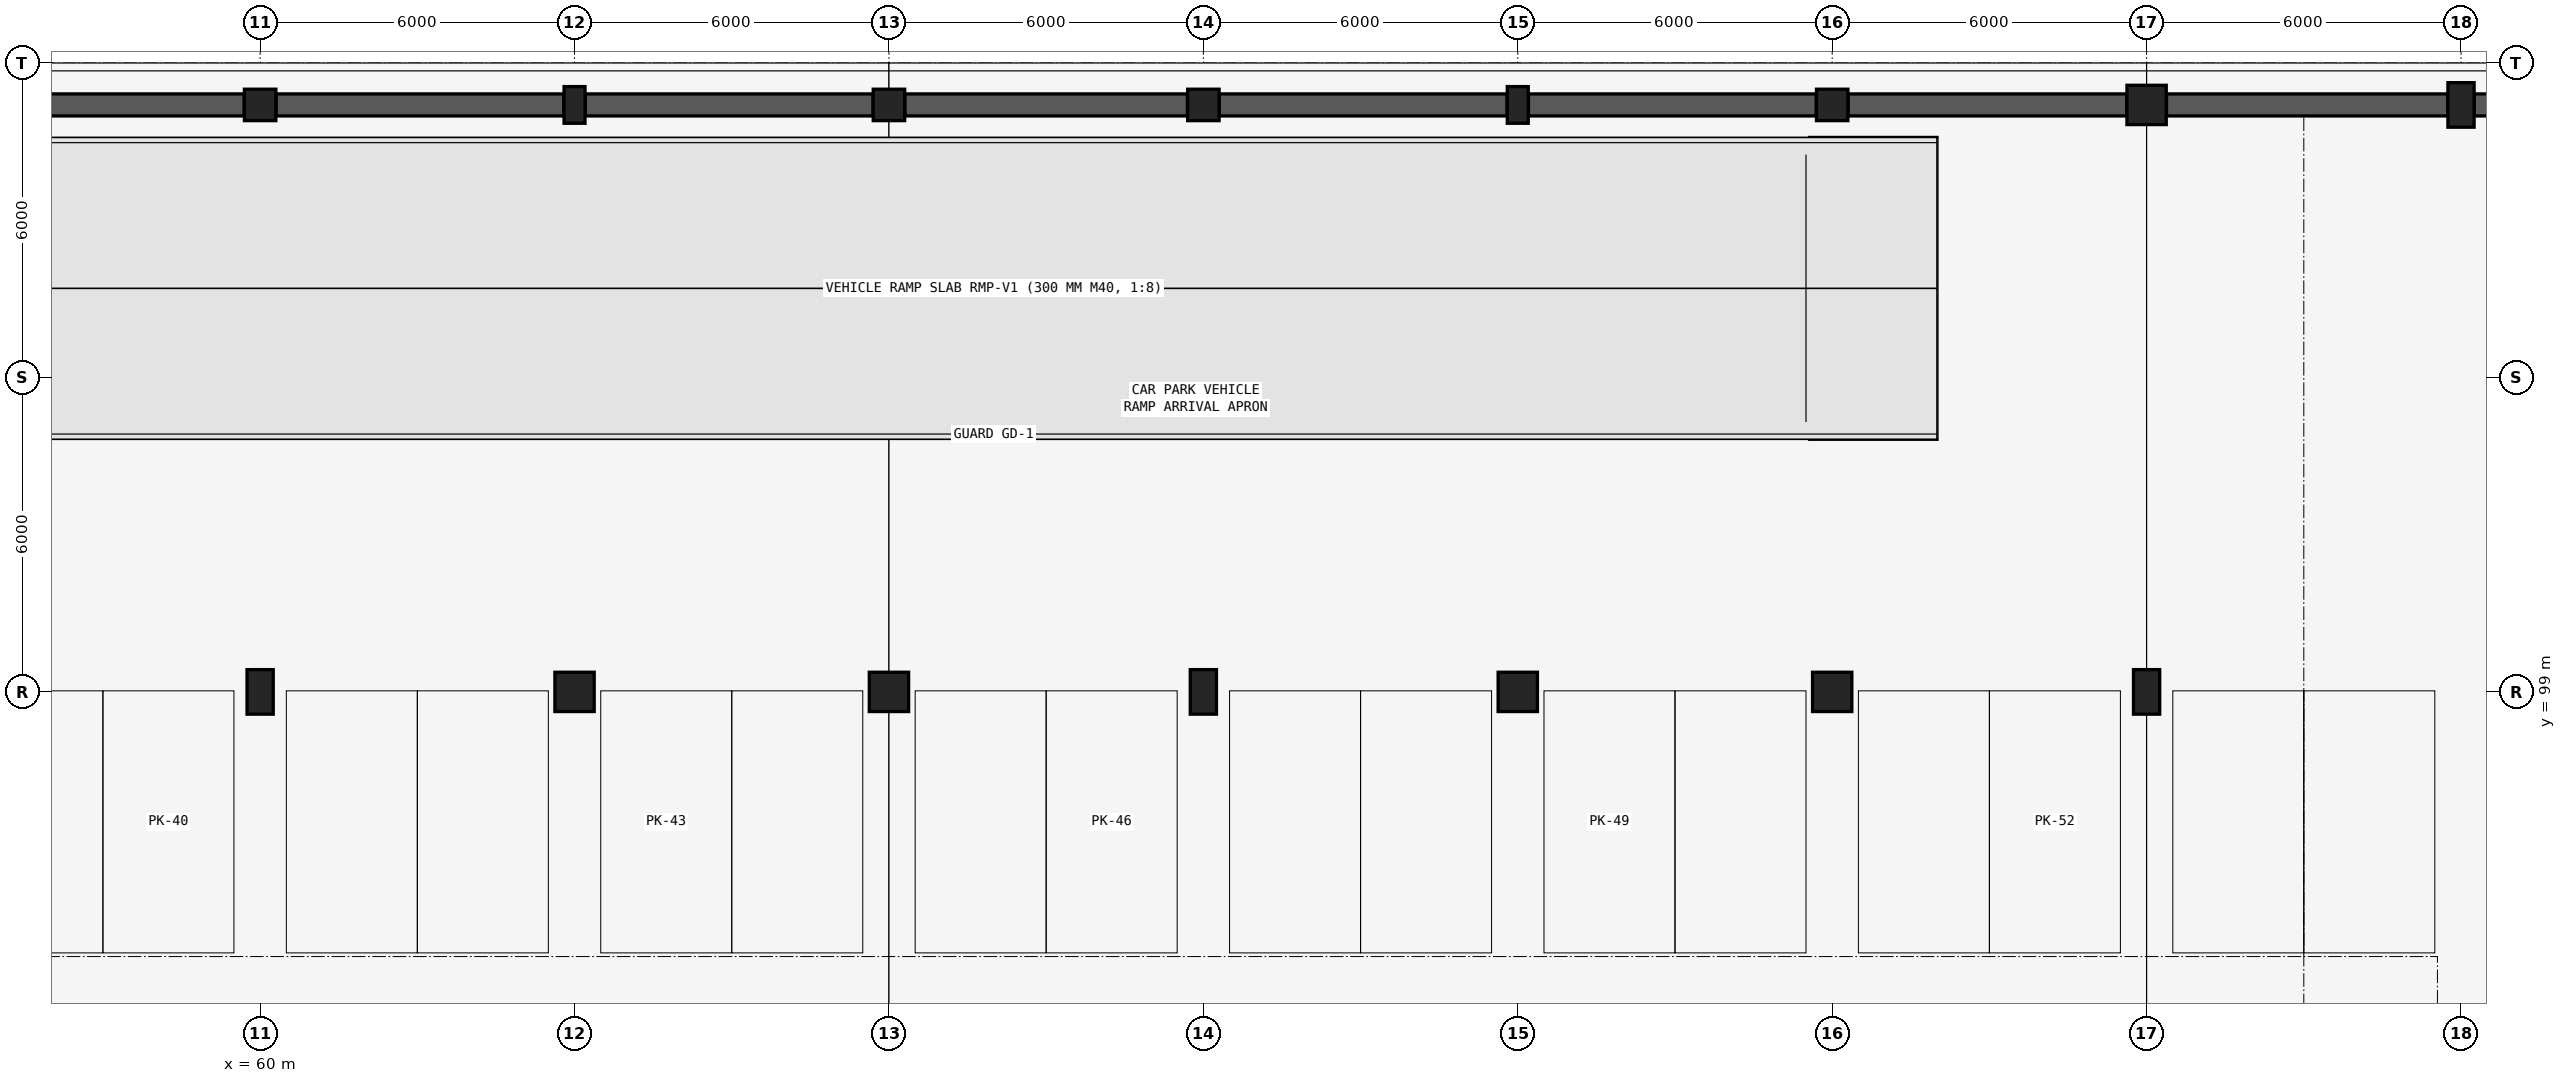
"""IFC4 building model, lengths in metres.
Left out: names, types, materials, properties, quantities, classifications, styles, units other than length and angle.
Written with IfcOpenShell. Run it as: python <this file> out.ifc"""

import sys

from ifc_helpers import new_model, si_unit, direction, frame, frame_2d, origin, origin_2d, place, context, subcontext, project, spatial, rectangle, extrude, element, save


model = new_model("IFC4")
c1 = context("Model", 3, precision=1e-05, world=origin(), true_north=direction((0.0, 1.0)))
c2 = subcontext(c1, "Body", "Model", "MODEL_VIEW")
j1 = project(units=[si_unit("LENGTHUNIT", "METRE"), si_unit("PLANEANGLEUNIT", "RADIAN")], contexts=[c1])
p1 = place(None, origin())
s1 = spatial("IfcSite", under=j1, at=p1, CompositionType="ELEMENT")
p2 = place(p1, origin())
s2 = spatial("IfcBuilding", under=s1, at=p2, CompositionType="ELEMENT")
p3 = place(p2, frame((0.0, 0.0, -4.5)))
s3 = spatial("IfcBuildingStorey", under=s2, at=p3, CompositionType="ELEMENT", Elevation=-4.5)
p4 = place(p3, frame((60.0, 99.0, 0.0), z_axis=(0.0, 0.0, 1.0), x_axis=(1.0, 0.0, 0.0)))
e1 = element("IfcColumn", 1, at=p4, inside=s3, PredefinedType="COLUMN", context=c2, shape_type="SweptSolid", body=[
    extrude(rectangle(XDim=0.5, YDim=0.85, at=origin_2d()), origin(), (0.0, 0.0, 1.0), 4.5),
])
p5 = place(p3, frame((60.0, 110.2, 0.0), z_axis=(0.0, 0.0, 1.0), x_axis=(1.0, 0.0, 0.0)))
e2 = element("IfcColumn", 2, at=p5, inside=s3, PredefinedType="COLUMN", context=c2, shape_type="SweptSolid", body=[
    extrude(rectangle(XDim=0.6, YDim=0.6, at=origin_2d()), origin(), (0.0, 0.0, 1.0), 4.5),
])
p6 = place(p3, frame((66.0, 99.0, 0.0), z_axis=(0.0, 0.0, 1.0), x_axis=(1.0, 0.0, 0.0)))
e3 = element("IfcColumn", 3, at=p6, inside=s3, PredefinedType="COLUMN", context=c2, shape_type="SweptSolid", body=[
    extrude(rectangle(XDim=0.75, YDim=0.75, at=origin_2d()), origin(), (0.0, 0.0, 1.0), 4.5),
])
p7 = place(p3, frame((66.0, 110.2, 0.0), z_axis=(0.0, 0.0, 1.0), x_axis=(1.0, 0.0, 0.0)))
e4 = element("IfcColumn", 4, at=p7, inside=s3, PredefinedType="COLUMN", context=c2, shape_type="SweptSolid", body=[
    extrude(rectangle(XDim=0.4, YDim=0.7, at=origin_2d()), origin(), (0.0, 0.0, 1.0), 4.5),
])
p8 = place(p3, frame((72.0, 99.0, 0.0), z_axis=(0.0, 0.0, 1.0), x_axis=(1.0, 0.0, 0.0)))
e5 = element("IfcColumn", 5, at=p8, inside=s3, PredefinedType="COLUMN", context=c2, shape_type="SweptSolid", body=[
    extrude(rectangle(XDim=0.75, YDim=0.75, at=origin_2d()), origin(), (0.0, 0.0, 1.0), 4.5),
])
p9 = place(p3, frame((72.0, 110.2, 0.0), z_axis=(0.0, 0.0, 1.0), x_axis=(1.0, 0.0, 0.0)))
e6 = element("IfcColumn", 6, at=p9, inside=s3, PredefinedType="COLUMN", context=c2, shape_type="SweptSolid", body=[
    extrude(rectangle(XDim=0.6, YDim=0.6, at=origin_2d()), origin(), (0.0, 0.0, 1.0), 4.5),
])
p10 = place(p3, frame((78.0, 99.0, 0.0), z_axis=(0.0, 0.0, 1.0), x_axis=(1.0, 0.0, 0.0)))
e7 = element("IfcColumn", 7, at=p10, inside=s3, PredefinedType="COLUMN", context=c2, shape_type="SweptSolid", body=[
    extrude(rectangle(XDim=0.5, YDim=0.85, at=origin_2d()), origin(), (0.0, 0.0, 1.0), 4.5),
])
p11 = place(p3, frame((78.0, 110.2, 0.0), z_axis=(0.0, 0.0, 1.0), x_axis=(1.0, 0.0, 0.0)))
e8 = element("IfcColumn", 8, at=p11, inside=s3, PredefinedType="COLUMN", context=c2, shape_type="SweptSolid", body=[
    extrude(rectangle(XDim=0.6, YDim=0.6, at=origin_2d()), origin(), (0.0, 0.0, 1.0), 4.5),
])
p12 = place(p3, frame((84.0, 99.0, 0.0), z_axis=(0.0, 0.0, 1.0), x_axis=(1.0, 0.0, 0.0)))
e9 = element("IfcColumn", 9, at=p12, inside=s3, PredefinedType="COLUMN", context=c2, shape_type="SweptSolid", body=[
    extrude(rectangle(XDim=0.75, YDim=0.75, at=origin_2d()), origin(), (0.0, 0.0, 1.0), 4.5),
])
p13 = place(p3, frame((84.0, 110.2, 0.0), z_axis=(0.0, 0.0, 1.0), x_axis=(1.0, 0.0, 0.0)))
e10 = element("IfcColumn", 10, at=p13, inside=s3, PredefinedType="COLUMN", context=c2, shape_type="SweptSolid", body=[
    extrude(rectangle(XDim=0.4, YDim=0.7, at=origin_2d()), origin(), (0.0, 0.0, 1.0), 4.5),
])
p14 = place(p3, frame((90.0, 99.0, 0.0), z_axis=(0.0, 0.0, 1.0), x_axis=(1.0, 0.0, 0.0)))
e11 = element("IfcColumn", 11, at=p14, inside=s3, PredefinedType="COLUMN", context=c2, shape_type="SweptSolid", body=[
    extrude(rectangle(XDim=0.75, YDim=0.75, at=origin_2d()), origin(), (0.0, 0.0, 1.0), 4.5),
])
p15 = place(p3, frame((90.0, 110.2, 0.0), z_axis=(0.0, 0.0, 1.0), x_axis=(1.0, 0.0, 0.0)))
e12 = element("IfcColumn", 12, at=p15, inside=s3, PredefinedType="COLUMN", context=c2, shape_type="SweptSolid", body=[
    extrude(rectangle(XDim=0.6, YDim=0.6, at=origin_2d()), origin(), (0.0, 0.0, 1.0), 4.5),
])
p16 = place(p3, frame((96.0, 99.0, 0.0), z_axis=(0.0, 0.0, 1.0), x_axis=(1.0, 0.0, 0.0)))
e13 = element("IfcColumn", 13, at=p16, inside=s3, PredefinedType="COLUMN", context=c2, shape_type="SweptSolid", body=[
    extrude(rectangle(XDim=0.5, YDim=0.85, at=origin_2d()), origin(), (0.0, 0.0, 1.0), 4.5),
])
p17 = place(p3, frame((96.0, 110.2, 0.0), z_axis=(0.0, 0.0, 1.0), x_axis=(1.0, 0.0, 0.0)))
e14 = element("IfcColumn", 14, at=p17, inside=s3, PredefinedType="COLUMN", context=c2, shape_type="SweptSolid", body=[
    extrude(rectangle(XDim=0.75, YDim=0.75, at=origin_2d()), origin(), (0.0, 0.0, 1.0), 4.5),
])
p18 = place(p3, frame((102.0, 110.2, 0.0), z_axis=(0.0, 0.0, 1.0), x_axis=(1.0, 0.0, 0.0)))
e15 = element("IfcColumn", 15, at=p18, inside=s3, PredefinedType="COLUMN", context=c2, shape_type="SweptSolid", body=[
    extrude(rectangle(XDim=0.5, YDim=0.85, at=origin_2d()), origin(), (0.0, 0.0, 1.0), 4.5),
])
p19 = place(p3, frame((54.379, 110.2, 0.0), z_axis=(0.0, 0.0, 1.0), x_axis=(1.0, 0.0, 0.0)))
e16 = element("IfcWall", 16, at=p19, inside=s3, PredefinedType="SHEAR", context=c2, shape_type="SweptSolid", body=[
    extrude(rectangle(XDim=5.317, YDim=0.42, at=frame_2d((2.659, 0.0))), origin(), (0.0, 0.0, 1.0), 4.195),
])
for number, where, z_axis, x_axis in (
    (17, (60.304, 110.2, 0.0), (0.0, 0.0, 1.0), (1.0, 0.0, 0.0)),
    (18, (66.204, 110.2, 0.0), (0.0, 0.0, 1.0), (1.0, 0.0, 0.0)),
):
    element("IfcWall", number, at=place(p3, frame(where, z_axis=z_axis, x_axis=x_axis)), inside=s3, PredefinedType="SHEAR", context=c2, shape_type="SweptSolid", body=[
        extrude(rectangle(XDim=5.492, YDim=0.42, at=frame_2d((2.746, 0.0))), origin(), (0.0, 0.0, 1.0), 4.195),
    ])
p20 = place(p3, frame((72.304, 110.2, 0.0), z_axis=(0.0, 0.0, 1.0), x_axis=(1.0, 0.0, 0.0)))
e19 = element("IfcWall", 19, at=p20, inside=s3, PredefinedType="SHEAR", context=c2, shape_type="SweptSolid", body=[
    extrude(rectangle(XDim=5.392, YDim=0.42, at=frame_2d((2.696, 0.0))), origin(), (0.0, 0.0, 1.0), 4.195),
])
for number, where, z_axis, x_axis in (
    (20, (78.304, 110.2, 0.0), (0.0, 0.0, 1.0), (1.0, 0.0, 0.0)),
    (21, (84.204, 110.2, 0.0), (0.0, 0.0, 1.0), (1.0, 0.0, 0.0)),
):
    element("IfcWall", number, at=place(p3, frame(where, z_axis=z_axis, x_axis=x_axis)), inside=s3, PredefinedType="SHEAR", context=c2, shape_type="SweptSolid", body=[
        extrude(rectangle(XDim=5.492, YDim=0.42, at=frame_2d((2.746, 0.0))), origin(), (0.0, 0.0, 1.0), 4.195),
    ])
p21 = place(p3, frame((90.304, 110.2, 0.0), z_axis=(0.0, 0.0, 1.0), x_axis=(1.0, 0.0, 0.0)))
e22 = element("IfcWall", 22, at=p21, inside=s3, PredefinedType="SHEAR", context=c2, shape_type="SweptSolid", body=[
    extrude(rectangle(XDim=5.317, YDim=0.42, at=frame_2d((2.659, 0.0))), origin(), (0.0, 0.0, 1.0), 4.195),
])
for number, where, z_axis, x_axis in (
    (23, (96.379, 110.2, 0.0), (0.0, 0.0, 1.0), (1.0, 0.0, 0.0)),
    (24, (102.254, 110.2, 0.0), (0.0, 0.0, 1.0), (1.0, 0.0, 0.0)),
):
    element("IfcWall", number, at=place(p3, frame(where, z_axis=z_axis, x_axis=x_axis)), inside=s3, PredefinedType="SHEAR", context=c2, shape_type="SweptSolid", body=[
        extrude(rectangle(XDim=5.367, YDim=0.42, at=frame_2d((2.684, 0.0))), origin(), (0.0, 0.0, 1.0), 4.195),
    ])
save(model, sys.argv[1])
